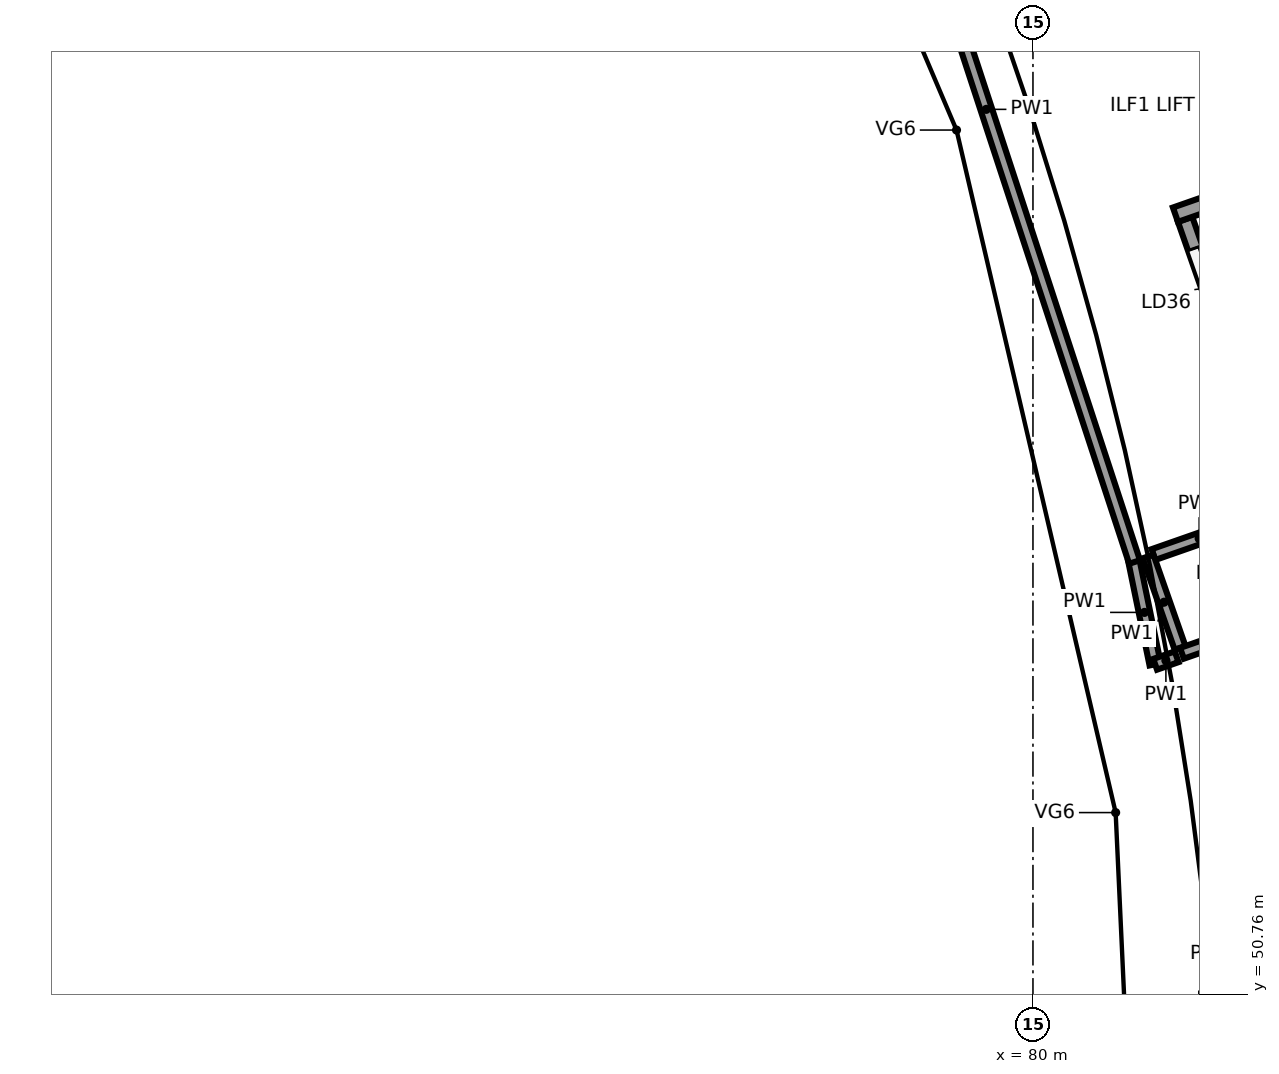
"""IFC4 building model, lengths in metres.
Left out: names, types, materials, properties, quantities, classifications, styles, units other than length and angle.
Written with IfcOpenShell. Run it as: python <this file> out.ifc"""

import sys

from ifc_helpers import new_model, si_unit, direction, frame, frame_2d, origin, origin_2d, place, context, subcontext, project, spatial, rectangle, circle, extrude, element, fill, save


model = new_model("IFC4")
c1 = context("Model", 3, precision=1e-05, world=origin(), true_north=direction((0.0, 1.0)))
c2 = subcontext(c1, "Body", "Model", "MODEL_VIEW")
j1 = project(units=[si_unit("LENGTHUNIT", "METRE"), si_unit("PLANEANGLEUNIT", "RADIAN")], contexts=[c1])
p1 = place(None, origin())
s1 = spatial("IfcSite", under=j1, at=p1, CompositionType="ELEMENT")
p2 = place(p1, origin())
s2 = spatial("IfcBuilding", under=s1, at=p2, CompositionType="ELEMENT")
p3 = place(p2, frame((0.0, 0.0, 24.0)))
s3 = spatial("IfcBuildingStorey", under=s2, at=p3, CompositionType="ELEMENT", Elevation=24.0)
p4 = place(p3, frame((82.12, 63.191, 0.0), z_axis=(0.0, 0.0, 1.0), x_axis=(1.0, 0.0, 0.0)))
e1 = element("IfcColumn", 1, at=p4, inside=s3, PredefinedType="COLUMN", context=c2, shape_type="SweptSolid", body=[
    extrude(circle(Radius=0.6, at=origin_2d()), origin(), (0.0, 0.0, 1.0), 6.0),
])
p5 = place(p3, frame((84.706, 62.008, 0.0), z_axis=(0.0, 0.0, 1.0), x_axis=(-0.943874847782, -0.330303302625, 0.0)))
e2 = element("IfcWall", 2, at=p5, inside=s3, PredefinedType="SHEAR", context=c2, shape_type="SweptSolid", body=[
    extrude(rectangle(XDim=3.0, YDim=0.2, at=frame_2d((1.5, 0.0))), origin(), (0.0, 0.0, 1.0), 4.6),
])
p6 = place(p3, frame((82.629, 59.162, 0.0), z_axis=(0.0, 0.0, 1.0), x_axis=(-0.330224505327, 0.943902418729, 0.0)))
e3 = element("IfcWall", 3, at=p6, inside=s3, PredefinedType="SHEAR", context=c2, shape_type="SweptSolid", body=[
    extrude(rectangle(XDim=1.9, YDim=0.2, at=frame_2d((0.95, 0.0))), origin(), (0.0, 0.0, 1.0), 4.6),
])
p7 = place(p6, frame((0.4, 0.0, 0.0)))
e4 = element("IfcOpeningElement", 4, at=p7, cuts=e3, PredefinedType="OPENING", context=c2, shape_type="SweptSolid", body=[
    extrude(rectangle(XDim=1.1, YDim=2.1, at=frame_2d((0.55, 1.05))), frame((0.0, 0.11, 0.0), z_axis=(0.0, -1.0, 0.0), x_axis=(1.0, 0.0, 0.0)), (0.0, 0.0, 1.0), 0.22),
])
for number, where, z_axis, x_axis in (
    (5, (82.789, 56.966, 0.0), (0.0, 0.0, 1.0), (-0.944, -0.33, 0.0)),
    (6, (81.514, 56.521, 0.0), (0.0, 0.0, 1.0), (0.33, -0.944, 0.0)),
):
    element("IfcWall", number, at=place(p3, frame(where, z_axis=z_axis, x_axis=x_axis)), inside=s3, PredefinedType="PARTITIONING", context=c2, shape_type="SweptSolid", body=[
        extrude(rectangle(XDim=1.275, YDim=0.15, at=frame_2d((0.637, 0.0))), origin(), (0.0, 0.0, 1.0), 5.4),
    ])
p8 = place(p3, frame((81.96, 55.246, 0.0), z_axis=(0.0, 0.0, 1.0), x_axis=(0.943888201207, 0.330265141396, 0.0)))
e7 = element("IfcWall", 7, at=p8, inside=s3, PredefinedType="PARTITIONING", context=c2, shape_type="SweptSolid", body=[
    extrude(rectangle(XDim=1.275, YDim=0.15, at=frame_2d((0.638, 0.0))), origin(), (0.0, 0.0, 1.0), 5.4),
])
p9 = place(p3, frame((81.327, 56.468, 0.0), z_axis=(0.0, 0.0, 1.0), x_axis=(0.200862273188, -0.979619491032, 0.0)))
e8 = element("IfcWall", 8, at=p9, inside=s3, PredefinedType="PARTITIONING", context=c2, shape_type="SweptSolid", body=[
    extrude(rectangle(XDim=1.394, YDim=0.15, at=frame_2d((0.697, 0.0))), origin(), (0.0, 0.0, 1.0), 5.4),
])
p10 = place(p3, frame((81.607, 55.102, 0.0), z_axis=(0.0, 0.0, 1.0), x_axis=(0.944111851886, 0.329625258633, 0.0)))
e9 = element("IfcWall", 9, at=p10, inside=s3, PredefinedType="PARTITIONING", context=c2, shape_type="SweptSolid", body=[
    extrude(rectangle(XDim=0.3, YDim=0.15, at=frame_2d((0.15, 0.0))), origin(), (0.0, 0.0, 1.0), 5.4),
])
p11 = place(p3, frame((77.435, 68.357, 0.0), z_axis=(0.0, 0.0, 1.0), x_axis=(0.311320262687, -0.950305053149, 0.0)))
e10 = element("IfcWall", 10, at=p11, inside=s3, PredefinedType="PARTITIONING", context=c2, shape_type="SweptSolid", body=[
    extrude(rectangle(XDim=12.532, YDim=0.15, at=frame_2d((6.266, 0.0))), origin(), (0.0, 0.0, 1.0), 5.4),
])
p12 = place(p7, origin())
e11 = element("IfcDoor", 11, at=p12, inside=s3, OperationType="SLIDING_TO_RIGHT", PredefinedType="DOOR", context=c2, shape_type="SweptSolid", body=[
    extrude(rectangle(XDim=1.1, YDim=2.1, at=frame_2d((0.55, 1.05))), frame((0.0, 0.025, 0.0), z_axis=(0.0, -1.0, 0.0), x_axis=(1.0, 0.0, 0.0)), (0.0, 0.0, 1.0), 0.05),
])
fill(e4, e11)
save(model, sys.argv[1])
